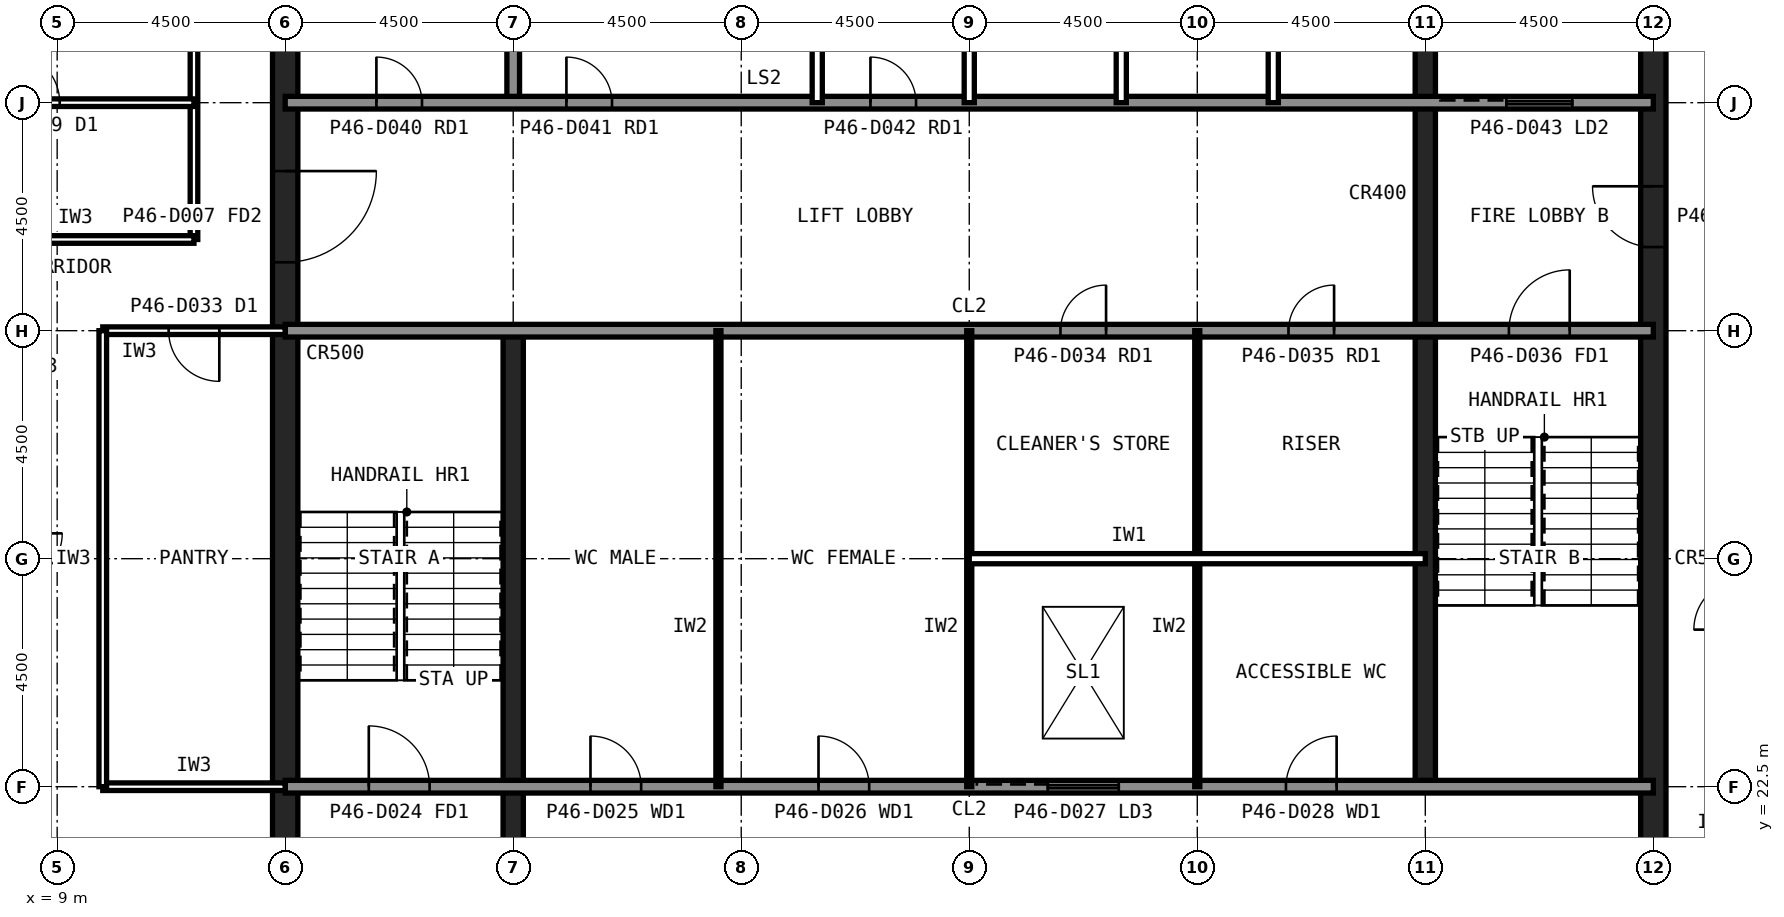
"""IFC4 building model, lengths in metres.
Left out: names, types, materials, properties, quantities, classifications, styles, units other than length and angle.
Written with IfcOpenShell. Run it as: python <this file> out.ifc"""

import sys

from ifc_helpers import new_model, si_unit, direction, frame, frame_2d, origin, place, context, subcontext, project, spatial, rectangle, extrude, element, fill, save


model = new_model("IFC4")
c1 = context("Model", 3, precision=1e-05, world=origin(), true_north=direction((0.0, 1.0)))
c2 = subcontext(c1, "Body", "Model", "MODEL_VIEW")
j1 = project(units=[si_unit("LENGTHUNIT", "METRE"), si_unit("PLANEANGLEUNIT", "RADIAN")], contexts=[c1])
p1 = place(None, origin())
s1 = spatial("IfcSite", under=j1, at=p1, CompositionType="ELEMENT")
p2 = place(p1, origin())
s2 = spatial("IfcBuilding", under=s1, at=p2, CompositionType="ELEMENT")
p3 = place(p2, frame((0.0, 0.0, 191.6)))
s3 = spatial("IfcBuildingStorey", under=s2, at=p3, CompositionType="ELEMENT", Elevation=191.6)
p4 = place(p3, frame((40.5, 13.5, 0.0), z_axis=(0.0, 0.0, 1.0), x_axis=(0.0, 1.0, 0.0)))
e1 = element("IfcWall", 1, at=p4, inside=s3, PredefinedType="SHEAR", context=c2, shape_type="SweptSolid", body=[
    extrude(rectangle(XDim=27.0, YDim=0.5, at=frame_2d((13.5, 0.0))), origin(), (0.0, 0.0, 1.0), 4.0),
])
p5 = place(p4, frame((5.85, 0.0, 0.0)))
e2 = element("IfcOpeningElement", 2, at=p5, cuts=e1, PredefinedType="OPENING", context=c2, shape_type="SweptSolid", body=[
    extrude(rectangle(XDim=1.8, YDim=2.1, at=frame_2d((0.9, 1.05))), frame((0.0, 0.26, 0.0), z_axis=(0.0, -1.0, 0.0), x_axis=(1.0, 0.0, 0.0)), (0.0, 0.0, 1.0), 0.52),
])
p6 = place(p4, frame((19.65, 0.0, 0.0)))
e3 = element("IfcOpeningElement", 3, at=p6, cuts=e1, PredefinedType="OPENING", context=c2, shape_type="SweptSolid", body=[
    extrude(rectangle(XDim=1.2, YDim=2.1, at=frame_2d((0.6, 1.05))), frame((0.0, 0.26, 0.0), z_axis=(0.0, -1.0, 0.0), x_axis=(1.0, 0.0, 0.0)), (0.0, 0.0, 1.0), 0.52),
])
p7 = place(p3, frame((13.5, 40.5, 0.0), z_axis=(0.0, 0.0, 1.0), x_axis=(0.0, -1.0, 0.0)))
e4 = element("IfcWall", 4, at=p7, inside=s3, PredefinedType="SHEAR", context=c2, shape_type="SweptSolid", body=[
    extrude(rectangle(XDim=27.0, YDim=0.5, at=frame_2d((13.5, 0.0))), origin(), (0.0, 0.0, 1.0), 4.0),
])
p8 = place(p7, frame((19.65, 0.0, 0.0)))
e5 = element("IfcOpeningElement", 5, at=p8, cuts=e4, PredefinedType="OPENING", context=c2, shape_type="SweptSolid", body=[
    extrude(rectangle(XDim=1.2, YDim=2.1, at=frame_2d((0.6, 1.05))), frame((0.0, 0.26, 0.0), z_axis=(0.0, -1.0, 0.0), x_axis=(1.0, 0.0, 0.0)), (0.0, 0.0, 1.0), 0.52),
])
p9 = place(p7, frame((5.85, 0.0, 0.0)))
e6 = element("IfcOpeningElement", 6, at=p9, cuts=e4, PredefinedType="OPENING", context=c2, shape_type="SweptSolid", body=[
    extrude(rectangle(XDim=1.8, YDim=2.1, at=frame_2d((0.9, 1.05))), frame((0.0, 0.26, 0.0), z_axis=(0.0, -1.0, 0.0), x_axis=(1.0, 0.0, 0.0)), (0.0, 0.0, 1.0), 0.52),
])
p10 = place(p3, frame((18.0, 13.5, 0.0), z_axis=(0.0, 0.0, 1.0), x_axis=(0.0, 1.0, 0.0)))
e7 = element("IfcWall", 7, at=p10, inside=s3, PredefinedType="SHEAR", context=c2, shape_type="SweptSolid", body=[
    extrude(rectangle(XDim=18.0, YDim=0.4, at=frame_2d((9.0, 0.0))), origin(), (0.0, 0.0, 1.0), 4.0),
])
p11 = place(p3, frame((18.0, 36.0, 0.0), z_axis=(0.0, 0.0, 1.0), x_axis=(0.0, 1.0, 0.0)))
e8 = element("IfcWall", 8, at=p11, inside=s3, PredefinedType="SOLIDWALL", context=c2, shape_type="SweptSolid", body=[
    extrude(rectangle(XDim=4.5, YDim=0.25, at=frame_2d((2.25, 0.0))), origin(), (0.0, 0.0, 1.0), 3.84),
])
p12 = place(p3, frame((36.0, 22.5, 0.0), z_axis=(0.0, 0.0, 1.0), x_axis=(0.0, 1.0, 0.0)))
e9 = element("IfcWall", 9, at=p12, inside=s3, PredefinedType="SHEAR", context=c2, shape_type="SweptSolid", body=[
    extrude(rectangle(XDim=18.0, YDim=0.4, at=frame_2d((9.0, 0.0))), origin(), (0.0, 0.0, 1.0), 4.0),
])
p13 = place(p3, frame((13.5, 36.0, 0.0), z_axis=(0.0, 0.0, 1.0), x_axis=(1.0, 0.0, 0.0)))
e10 = element("IfcWall", 10, at=p13, inside=s3, PredefinedType="SOLIDWALL", context=c2, shape_type="SweptSolid", body=[
    extrude(rectangle(XDim=27.0, YDim=0.25, at=frame_2d((13.5, 0.0))), origin(), (0.0, 0.0, 1.0), 3.84),
])
p14 = place(p13, frame((1.8, 0.0, 0.0)))
e11 = element("IfcOpeningElement", 11, at=p14, cuts=e10, PredefinedType="OPENING", context=c2, shape_type="SweptSolid", body=[
    extrude(rectangle(XDim=0.9, YDim=2.1, at=frame_2d((0.45, 1.05))), frame((0.0, 0.135, 0.0), z_axis=(0.0, -1.0, 0.0), x_axis=(1.0, 0.0, 0.0)), (0.0, 0.0, 1.0), 0.27),
])
p15 = place(p13, frame((5.55, 0.0, 0.0)))
e12 = element("IfcOpeningElement", 12, at=p15, cuts=e10, PredefinedType="OPENING", context=c2, shape_type="SweptSolid", body=[
    extrude(rectangle(XDim=0.9, YDim=2.1, at=frame_2d((0.45, 1.05))), frame((0.0, 0.135, 0.0), z_axis=(0.0, -1.0, 0.0), x_axis=(1.0, 0.0, 0.0)), (0.0, 0.0, 1.0), 0.27),
])
p16 = place(p13, frame((8.55, 0.0, 0.0)))
e13 = element("IfcOpeningElement", 13, at=p16, cuts=e10, PredefinedType="OPENING", context=c2, shape_type="SweptSolid", body=[
    extrude(rectangle(XDim=0.9, YDim=2.1, at=frame_2d((0.45, 1.05))), frame((0.0, 0.135, 0.0), z_axis=(0.0, -1.0, 0.0), x_axis=(1.0, 0.0, 0.0)), (0.0, 0.0, 1.0), 0.27),
])
p17 = place(p13, frame((11.55, 0.0, 0.0)))
e14 = element("IfcOpeningElement", 14, at=p17, cuts=e10, PredefinedType="OPENING", context=c2, shape_type="SweptSolid", body=[
    extrude(rectangle(XDim=0.9, YDim=2.1, at=frame_2d((0.45, 1.05))), frame((0.0, 0.135, 0.0), z_axis=(0.0, -1.0, 0.0), x_axis=(1.0, 0.0, 0.0)), (0.0, 0.0, 1.0), 0.27),
])
p18 = place(p13, frame((24.1, 0.0, 0.0)))
e15 = element("IfcOpeningElement", 15, at=p18, cuts=e10, PredefinedType="OPENING", context=c2, shape_type="SweptSolid", body=[
    extrude(rectangle(XDim=1.3, YDim=2.2, at=frame_2d((0.65, 1.1))), frame((0.0, 0.135, 0.0), z_axis=(0.0, -1.0, 0.0), x_axis=(1.0, 0.0, 0.0)), (0.0, 0.0, 1.0), 0.27),
])
p19 = place(p3, frame((13.5, 22.5, 0.0), z_axis=(0.0, 0.0, 1.0), x_axis=(1.0, 0.0, 0.0)))
e16 = element("IfcWall", 16, at=p19, inside=s3, PredefinedType="SOLIDWALL", context=c2, shape_type="SweptSolid", body=[
    extrude(rectangle(XDim=27.0, YDim=0.25, at=frame_2d((13.5, 0.0))), origin(), (0.0, 0.0, 1.0), 3.84),
])
p20 = place(p19, frame((1.65, 0.0, 0.0)))
e17 = element("IfcOpeningElement", 17, at=p20, cuts=e16, PredefinedType="OPENING", context=c2, shape_type="SweptSolid", body=[
    extrude(rectangle(XDim=1.2, YDim=2.1, at=frame_2d((0.6, 1.05))), frame((0.0, 0.135, 0.0), z_axis=(0.0, -1.0, 0.0), x_axis=(1.0, 0.0, 0.0)), (0.0, 0.0, 1.0), 0.27),
])
p21 = place(p19, frame((6.025, 0.0, 0.0)))
e18 = element("IfcOpeningElement", 18, at=p21, cuts=e16, PredefinedType="OPENING", context=c2, shape_type="SweptSolid", body=[
    extrude(rectangle(XDim=1.0, YDim=2.1, at=frame_2d((0.5, 1.05))), frame((0.0, 0.135, 0.0), z_axis=(0.0, -1.0, 0.0), x_axis=(1.0, 0.0, 0.0)), (0.0, 0.0, 1.0), 0.27),
])
p22 = place(p19, frame((10.525, 0.0, 0.0)))
e19 = element("IfcOpeningElement", 19, at=p22, cuts=e16, PredefinedType="OPENING", context=c2, shape_type="SweptSolid", body=[
    extrude(rectangle(XDim=1.0, YDim=2.1, at=frame_2d((0.5, 1.05))), frame((0.0, 0.135, 0.0), z_axis=(0.0, -1.0, 0.0), x_axis=(1.0, 0.0, 0.0)), (0.0, 0.0, 1.0), 0.27),
])
p23 = place(p19, frame((19.75, 0.0, 0.0)))
e20 = element("IfcOpeningElement", 20, at=p23, cuts=e16, PredefinedType="OPENING", context=c2, shape_type="SweptSolid", body=[
    extrude(rectangle(XDim=1.0, YDim=2.1, at=frame_2d((0.5, 1.05))), frame((0.0, 0.135, 0.0), z_axis=(0.0, -1.0, 0.0), x_axis=(1.0, 0.0, 0.0)), (0.0, 0.0, 1.0), 0.27),
])
p24 = place(p19, frame((15.05, 0.0, 0.0)))
e21 = element("IfcOpeningElement", 21, at=p24, cuts=e16, PredefinedType="OPENING", context=c2, shape_type="SweptSolid", body=[
    extrude(rectangle(XDim=1.4, YDim=2.4, at=frame_2d((0.7, 1.2))), frame((0.0, 0.135, 0.0), z_axis=(0.0, -1.0, 0.0), x_axis=(1.0, 0.0, 0.0)), (0.0, 0.0, 1.0), 0.27),
])
p25 = place(p3, frame((13.5, 31.5, 0.0), z_axis=(0.0, 0.0, 1.0), x_axis=(1.0, 0.0, 0.0)))
e22 = element("IfcWall", 22, at=p25, inside=s3, PredefinedType="SOLIDWALL", context=c2, shape_type="SweptSolid", body=[
    extrude(rectangle(XDim=27.0, YDim=0.25, at=frame_2d((13.5, 0.0))), origin(), (0.0, 0.0, 1.0), 3.84),
])
p26 = place(p25, frame((24.15, 0.0, 0.0)))
e23 = element("IfcOpeningElement", 23, at=p26, cuts=e22, PredefinedType="OPENING", context=c2, shape_type="SweptSolid", body=[
    extrude(rectangle(XDim=1.2, YDim=2.1, at=frame_2d((0.6, 1.05))), frame((0.0, 0.135, 0.0), z_axis=(0.0, -1.0, 0.0), x_axis=(1.0, 0.0, 0.0)), (0.0, 0.0, 1.0), 0.27),
])
p27 = place(p25, frame((15.3, 0.0, 0.0)))
e24 = element("IfcOpeningElement", 24, at=p27, cuts=e22, PredefinedType="OPENING", context=c2, shape_type="SweptSolid", body=[
    extrude(rectangle(XDim=0.9, YDim=2.1, at=frame_2d((0.45, 1.05))), frame((0.0, 0.135, 0.0), z_axis=(0.0, -1.0, 0.0), x_axis=(1.0, 0.0, 0.0)), (0.0, 0.0, 1.0), 0.27),
])
p28 = place(p25, frame((19.8, 0.0, 0.0)))
e25 = element("IfcOpeningElement", 25, at=p28, cuts=e22, PredefinedType="OPENING", context=c2, shape_type="SweptSolid", body=[
    extrude(rectangle(XDim=0.9, YDim=2.1, at=frame_2d((0.45, 1.05))), frame((0.0, 0.135, 0.0), z_axis=(0.0, -1.0, 0.0), x_axis=(1.0, 0.0, 0.0)), (0.0, 0.0, 1.0), 0.27),
])
for number, where, z_axis, x_axis in (
    (26, (21.0, 36.0, 0.0), (0.0, 0.0, 1.0), (0.0, 1.0, 0.0)),
    (27, (24.0, 36.0, 0.0), (0.0, 0.0, 1.0), (0.0, 1.0, 0.0)),
    (28, (27.0, 36.0, 0.0), (0.0, 0.0, 1.0), (0.0, 1.0, 0.0)),
    (29, (30.0, 36.0, 0.0), (0.0, 0.0, 1.0), (0.0, 1.0, 0.0)),
    (30, (33.0, 36.0, 0.0), (0.0, 0.0, 1.0), (0.0, 1.0, 0.0)),
):
    element("IfcWall", number, at=place(p3, frame(where, z_axis=z_axis, x_axis=x_axis)), inside=s3, PredefinedType="PARTITIONING", context=c2, shape_type="SweptSolid", body=[
        extrude(rectangle(XDim=4.5, YDim=0.2, at=frame_2d((2.25, 0.0))), origin(), (0.0, 0.0, 1.0), 3.84),
    ])
for number, where, z_axis, x_axis in (
    (31, (22.05, 22.5, 0.0), (0.0, 0.0, 1.0), (0.0, 1.0, 0.0)),
    (32, (27.0, 22.5, 0.0), (0.0, 0.0, 1.0), (0.0, 1.0, 0.0)),
    (33, (31.5, 22.5, 0.0), (0.0, 0.0, 1.0), (0.0, 1.0, 0.0)),
):
    element("IfcWall", number, at=place(p3, frame(where, z_axis=z_axis, x_axis=x_axis)), inside=s3, PredefinedType="PLUMBINGWALL", context=c2, shape_type="SweptSolid", body=[
        extrude(rectangle(XDim=9.0, YDim=0.1, at=frame_2d((4.5, 0.0))), origin(), (0.0, 0.0, 1.0), 3.84),
    ])
p29 = place(p3, frame((27.0, 27.0, 0.0), z_axis=(0.0, 0.0, 1.0), x_axis=(1.0, 0.0, 0.0)))
e34 = element("IfcWall", 34, at=p29, inside=s3, PredefinedType="PARTITIONING", context=c2, shape_type="SweptSolid", body=[
    extrude(rectangle(XDim=9.0, YDim=0.2, at=frame_2d((4.5, 0.0))), origin(), (0.0, 0.0, 1.0), 3.84),
])
p30 = place(p3, frame((11.7, 40.5, 0.0), z_axis=(0.0, 0.0, 1.0), x_axis=(0.0, -1.0, 0.0)))
e35 = element("IfcWall", 35, at=p30, inside=s3, PredefinedType="PARTITIONING", context=c2, shape_type="SweptSolid", body=[
    extrude(rectangle(XDim=7.2, YDim=0.15, at=frame_2d((3.6, 0.0))), origin(), (0.0, 0.0, 1.0), 3.84),
])
p31 = place(p3, frame((11.7, 33.3, 0.0), z_axis=(0.0, 0.0, 1.0), x_axis=(-1.0, 0.0, 0.0)))
e36 = element("IfcWall", 36, at=p31, inside=s3, PredefinedType="PARTITIONING", context=c2, shape_type="SweptSolid", body=[
    extrude(rectangle(XDim=3.6, YDim=0.15, at=frame_2d((1.8, 0.0))), origin(), (0.0, 0.0, 1.0), 3.84),
])
p32 = place(p3, frame((9.9, 22.5, 0.0), z_axis=(0.0, 0.0, 1.0), x_axis=(1.0, 0.0, 0.0)))
e37 = element("IfcWall", 37, at=p32, inside=s3, PredefinedType="PARTITIONING", context=c2, shape_type="SweptSolid", body=[
    extrude(rectangle(XDim=3.6, YDim=0.15, at=frame_2d((1.8, 0.0))), origin(), (0.0, 0.0, 1.0), 2.989),
])
p33 = place(p3, frame((13.5, 31.5, 0.0), z_axis=(0.0, 0.0, 1.0), x_axis=(-1.0, 0.0, 0.0)))
e38 = element("IfcWall", 38, at=p33, inside=s3, PredefinedType="PARTITIONING", context=c2, shape_type="SweptSolid", body=[
    extrude(rectangle(XDim=3.6, YDim=0.15, at=frame_2d((1.8, 0.0))), origin(), (0.0, 0.0, 1.0), 2.989),
])
p34 = place(p33, frame((1.3, 0.0, 0.0)))
e39 = element("IfcOpeningElement", 39, at=p34, cuts=e38, PredefinedType="OPENING", context=c2, shape_type="SweptSolid", body=[
    extrude(rectangle(XDim=1.0, YDim=2.1, at=frame_2d((0.5, 1.05))), frame((0.0, 0.085, 0.0), z_axis=(0.0, -1.0, 0.0), x_axis=(1.0, 0.0, 0.0)), (0.0, 0.0, 1.0), 0.17),
])
p35 = place(p3, frame((9.9, 31.5, 0.0), z_axis=(0.0, 0.0, 1.0), x_axis=(0.0, -1.0, 0.0)))
e40 = element("IfcWall", 40, at=p35, inside=s3, PredefinedType="PARTITIONING", context=c2, shape_type="SweptSolid", body=[
    extrude(rectangle(XDim=9.0, YDim=0.15, at=frame_2d((4.5, 0.0))), origin(), (0.0, 0.0, 1.0), 3.84),
])
p36 = place(p3, frame((5.4, 36.0, 0.0), z_axis=(0.0, 0.0, 1.0), x_axis=(1.0, 0.0, 0.0)))
e41 = element("IfcWall", 41, at=p36, inside=s3, PredefinedType="PARTITIONING", context=c2, shape_type="SweptSolid", body=[
    extrude(rectangle(XDim=6.3, YDim=0.15, at=frame_2d((3.15, 0.0))), origin(), (0.0, 0.0, 1.0), 2.989),
])
p37 = place(p36, frame((2.65, 0.0, 0.0)))
e42 = element("IfcOpeningElement", 42, at=p37, cuts=e41, PredefinedType="OPENING", context=c2, shape_type="SweptSolid", body=[
    extrude(rectangle(XDim=1.0, YDim=2.1, at=frame_2d((0.5, 1.05))), frame((0.0, 0.085, 0.0), z_axis=(0.0, -1.0, 0.0), x_axis=(1.0, 0.0, 0.0)), (0.0, 0.0, 1.0), 0.17),
])
p38 = place(p9, origin())
e43 = element("IfcDoor", 43, at=p38, inside=s3, OperationType="SINGLE_SWING_LEFT", PredefinedType="DOOR", context=c2, shape_type="SweptSolid", body=[
    extrude(rectangle(XDim=1.8, YDim=2.1, at=frame_2d((0.9, 1.05))), frame((0.0, 0.025, 0.0), z_axis=(0.0, -1.0, 0.0), x_axis=(1.0, 0.0, 0.0)), (0.0, 0.0, 1.0), 0.05),
])
fill(e6, e43)
p39 = place(p6, origin())
e44 = element("IfcDoor", 44, at=p39, inside=s3, OperationType="SINGLE_SWING_RIGHT", PredefinedType="DOOR", context=c2, shape_type="SweptSolid", body=[
    extrude(rectangle(XDim=1.2, YDim=2.1, at=frame_2d((0.6, 1.05))), frame((0.0, 0.025, 0.0), z_axis=(0.0, -1.0, 0.0), x_axis=(1.0, 0.0, 0.0)), (0.0, 0.0, 1.0), 0.05),
])
fill(e3, e44)
p40 = place(p20, origin())
e45 = element("IfcDoor", 45, at=p40, inside=s3, OperationType="SINGLE_SWING_LEFT", PredefinedType="DOOR", context=c2, shape_type="SweptSolid", body=[
    extrude(rectangle(XDim=1.2, YDim=2.1, at=frame_2d((0.6, 1.05))), frame((0.0, 0.025, 0.0), z_axis=(0.0, -1.0, 0.0), x_axis=(1.0, 0.0, 0.0)), (0.0, 0.0, 1.0), 0.05),
])
fill(e17, e45)
p41 = place(p26, origin())
e46 = element("IfcDoor", 46, at=p41, inside=s3, OperationType="SINGLE_SWING_RIGHT", PredefinedType="DOOR", context=c2, shape_type="SweptSolid", body=[
    extrude(rectangle(XDim=1.2, YDim=2.1, at=frame_2d((0.6, 1.05))), frame((0.0, 0.025, 0.0), z_axis=(0.0, -1.0, 0.0), x_axis=(1.0, 0.0, 0.0)), (0.0, 0.0, 1.0), 0.05),
])
fill(e23, e46)
p42 = place(p21, origin())
e47 = element("IfcDoor", 47, at=p42, inside=s3, OperationType="SINGLE_SWING_LEFT", PredefinedType="DOOR", context=c2, shape_type="SweptSolid", body=[
    extrude(rectangle(XDim=1.0, YDim=2.1, at=frame_2d((0.5, 1.05))), frame((0.0, 0.025, 0.0), z_axis=(0.0, -1.0, 0.0), x_axis=(1.0, 0.0, 0.0)), (0.0, 0.0, 1.0), 0.05),
])
fill(e18, e47)
p43 = place(p22, origin())
e48 = element("IfcDoor", 48, at=p43, inside=s3, OperationType="SINGLE_SWING_LEFT", PredefinedType="DOOR", context=c2, shape_type="SweptSolid", body=[
    extrude(rectangle(XDim=1.0, YDim=2.1, at=frame_2d((0.5, 1.05))), frame((0.0, 0.025, 0.0), z_axis=(0.0, -1.0, 0.0), x_axis=(1.0, 0.0, 0.0)), (0.0, 0.0, 1.0), 0.05),
])
fill(e19, e48)
p44 = place(p23, origin())
e49 = element("IfcDoor", 49, at=p44, inside=s3, OperationType="SINGLE_SWING_RIGHT", PredefinedType="DOOR", context=c2, shape_type="SweptSolid", body=[
    extrude(rectangle(XDim=1.0, YDim=2.1, at=frame_2d((0.5, 1.05))), frame((0.0, 0.025, 0.0), z_axis=(0.0, -1.0, 0.0), x_axis=(1.0, 0.0, 0.0)), (0.0, 0.0, 1.0), 0.05),
])
fill(e20, e49)
p45 = place(p27, origin())
e50 = element("IfcDoor", 50, at=p45, inside=s3, OperationType="SINGLE_SWING_RIGHT", PredefinedType="DOOR", context=c2, shape_type="SweptSolid", body=[
    extrude(rectangle(XDim=0.9, YDim=2.1, at=frame_2d((0.45, 1.05))), frame((0.0, 0.025, 0.0), z_axis=(0.0, -1.0, 0.0), x_axis=(1.0, 0.0, 0.0)), (0.0, 0.0, 1.0), 0.05),
])
fill(e24, e50)
p46 = place(p28, origin())
e51 = element("IfcDoor", 51, at=p46, inside=s3, OperationType="SINGLE_SWING_RIGHT", PredefinedType="DOOR", context=c2, shape_type="SweptSolid", body=[
    extrude(rectangle(XDim=0.9, YDim=2.1, at=frame_2d((0.45, 1.05))), frame((0.0, 0.025, 0.0), z_axis=(0.0, -1.0, 0.0), x_axis=(1.0, 0.0, 0.0)), (0.0, 0.0, 1.0), 0.05),
])
fill(e25, e51)
p47 = place(p14, origin())
e52 = element("IfcDoor", 52, at=p47, inside=s3, OperationType="SINGLE_SWING_LEFT", PredefinedType="DOOR", context=c2, shape_type="SweptSolid", body=[
    extrude(rectangle(XDim=0.9, YDim=2.1, at=frame_2d((0.45, 1.05))), frame((0.0, 0.025, 0.0), z_axis=(0.0, -1.0, 0.0), x_axis=(1.0, 0.0, 0.0)), (0.0, 0.0, 1.0), 0.05),
])
fill(e11, e52)
p48 = place(p15, origin())
e53 = element("IfcDoor", 53, at=p48, inside=s3, OperationType="SINGLE_SWING_LEFT", PredefinedType="DOOR", context=c2, shape_type="SweptSolid", body=[
    extrude(rectangle(XDim=0.9, YDim=2.1, at=frame_2d((0.45, 1.05))), frame((0.0, 0.025, 0.0), z_axis=(0.0, -1.0, 0.0), x_axis=(1.0, 0.0, 0.0)), (0.0, 0.0, 1.0), 0.05),
])
fill(e12, e53)
p49 = place(p16, origin())
e54 = element("IfcDoor", 54, at=p49, inside=s3, OperationType="SINGLE_SWING_LEFT", PredefinedType="DOOR", context=c2, shape_type="SweptSolid", body=[
    extrude(rectangle(XDim=0.9, YDim=2.1, at=frame_2d((0.45, 1.05))), frame((0.0, 0.025, 0.0), z_axis=(0.0, -1.0, 0.0), x_axis=(1.0, 0.0, 0.0)), (0.0, 0.0, 1.0), 0.05),
])
fill(e13, e54)
p50 = place(p17, origin())
e55 = element("IfcDoor", 55, at=p50, inside=s3, OperationType="SINGLE_SWING_LEFT", PredefinedType="DOOR", context=c2, shape_type="SweptSolid", body=[
    extrude(rectangle(XDim=0.9, YDim=2.1, at=frame_2d((0.45, 1.05))), frame((0.0, 0.025, 0.0), z_axis=(0.0, -1.0, 0.0), x_axis=(1.0, 0.0, 0.0)), (0.0, 0.0, 1.0), 0.05),
])
fill(e14, e55)
p51 = place(p18, origin())
e56 = element("IfcDoor", 56, at=p51, inside=s3, OperationType="SLIDING_TO_LEFT", PredefinedType="DOOR", context=c2, shape_type="SweptSolid", body=[
    extrude(rectangle(XDim=1.3, YDim=2.2, at=frame_2d((0.65, 1.1))), frame((0.0, 0.025, 0.0), z_axis=(0.0, -1.0, 0.0), x_axis=(1.0, 0.0, 0.0)), (0.0, 0.0, 1.0), 0.05),
])
fill(e15, e56)
p52 = place(p24, origin())
e57 = element("IfcDoor", 57, at=p52, inside=s3, OperationType="SLIDING_TO_LEFT", PredefinedType="DOOR", context=c2, shape_type="SweptSolid", body=[
    extrude(rectangle(XDim=1.4, YDim=2.4, at=frame_2d((0.7, 1.2))), frame((0.0, 0.025, 0.0), z_axis=(0.0, -1.0, 0.0), x_axis=(1.0, 0.0, 0.0)), (0.0, 0.0, 1.0), 0.05),
])
fill(e21, e57)
p53 = place(p34, origin())
e58 = element("IfcDoor", 58, at=p53, inside=s3, OperationType="SINGLE_SWING_LEFT", PredefinedType="DOOR", context=c2, shape_type="SweptSolid", body=[
    extrude(rectangle(XDim=1.0, YDim=2.1, at=frame_2d((0.5, 1.05))), frame((0.0, 0.025, 0.0), z_axis=(0.0, -1.0, 0.0), x_axis=(1.0, 0.0, 0.0)), (0.0, 0.0, 1.0), 0.05),
])
fill(e39, e58)
p54 = place(p37, origin())
e59 = element("IfcDoor", 59, at=p54, inside=s3, OperationType="SINGLE_SWING_LEFT", PredefinedType="DOOR", context=c2, shape_type="SweptSolid", body=[
    extrude(rectangle(XDim=1.0, YDim=2.1, at=frame_2d((0.5, 1.05))), frame((0.0, 0.025, 0.0), z_axis=(0.0, -1.0, 0.0), x_axis=(1.0, 0.0, 0.0)), (0.0, 0.0, 1.0), 0.05),
])
fill(e42, e59)
save(model, sys.argv[1])
